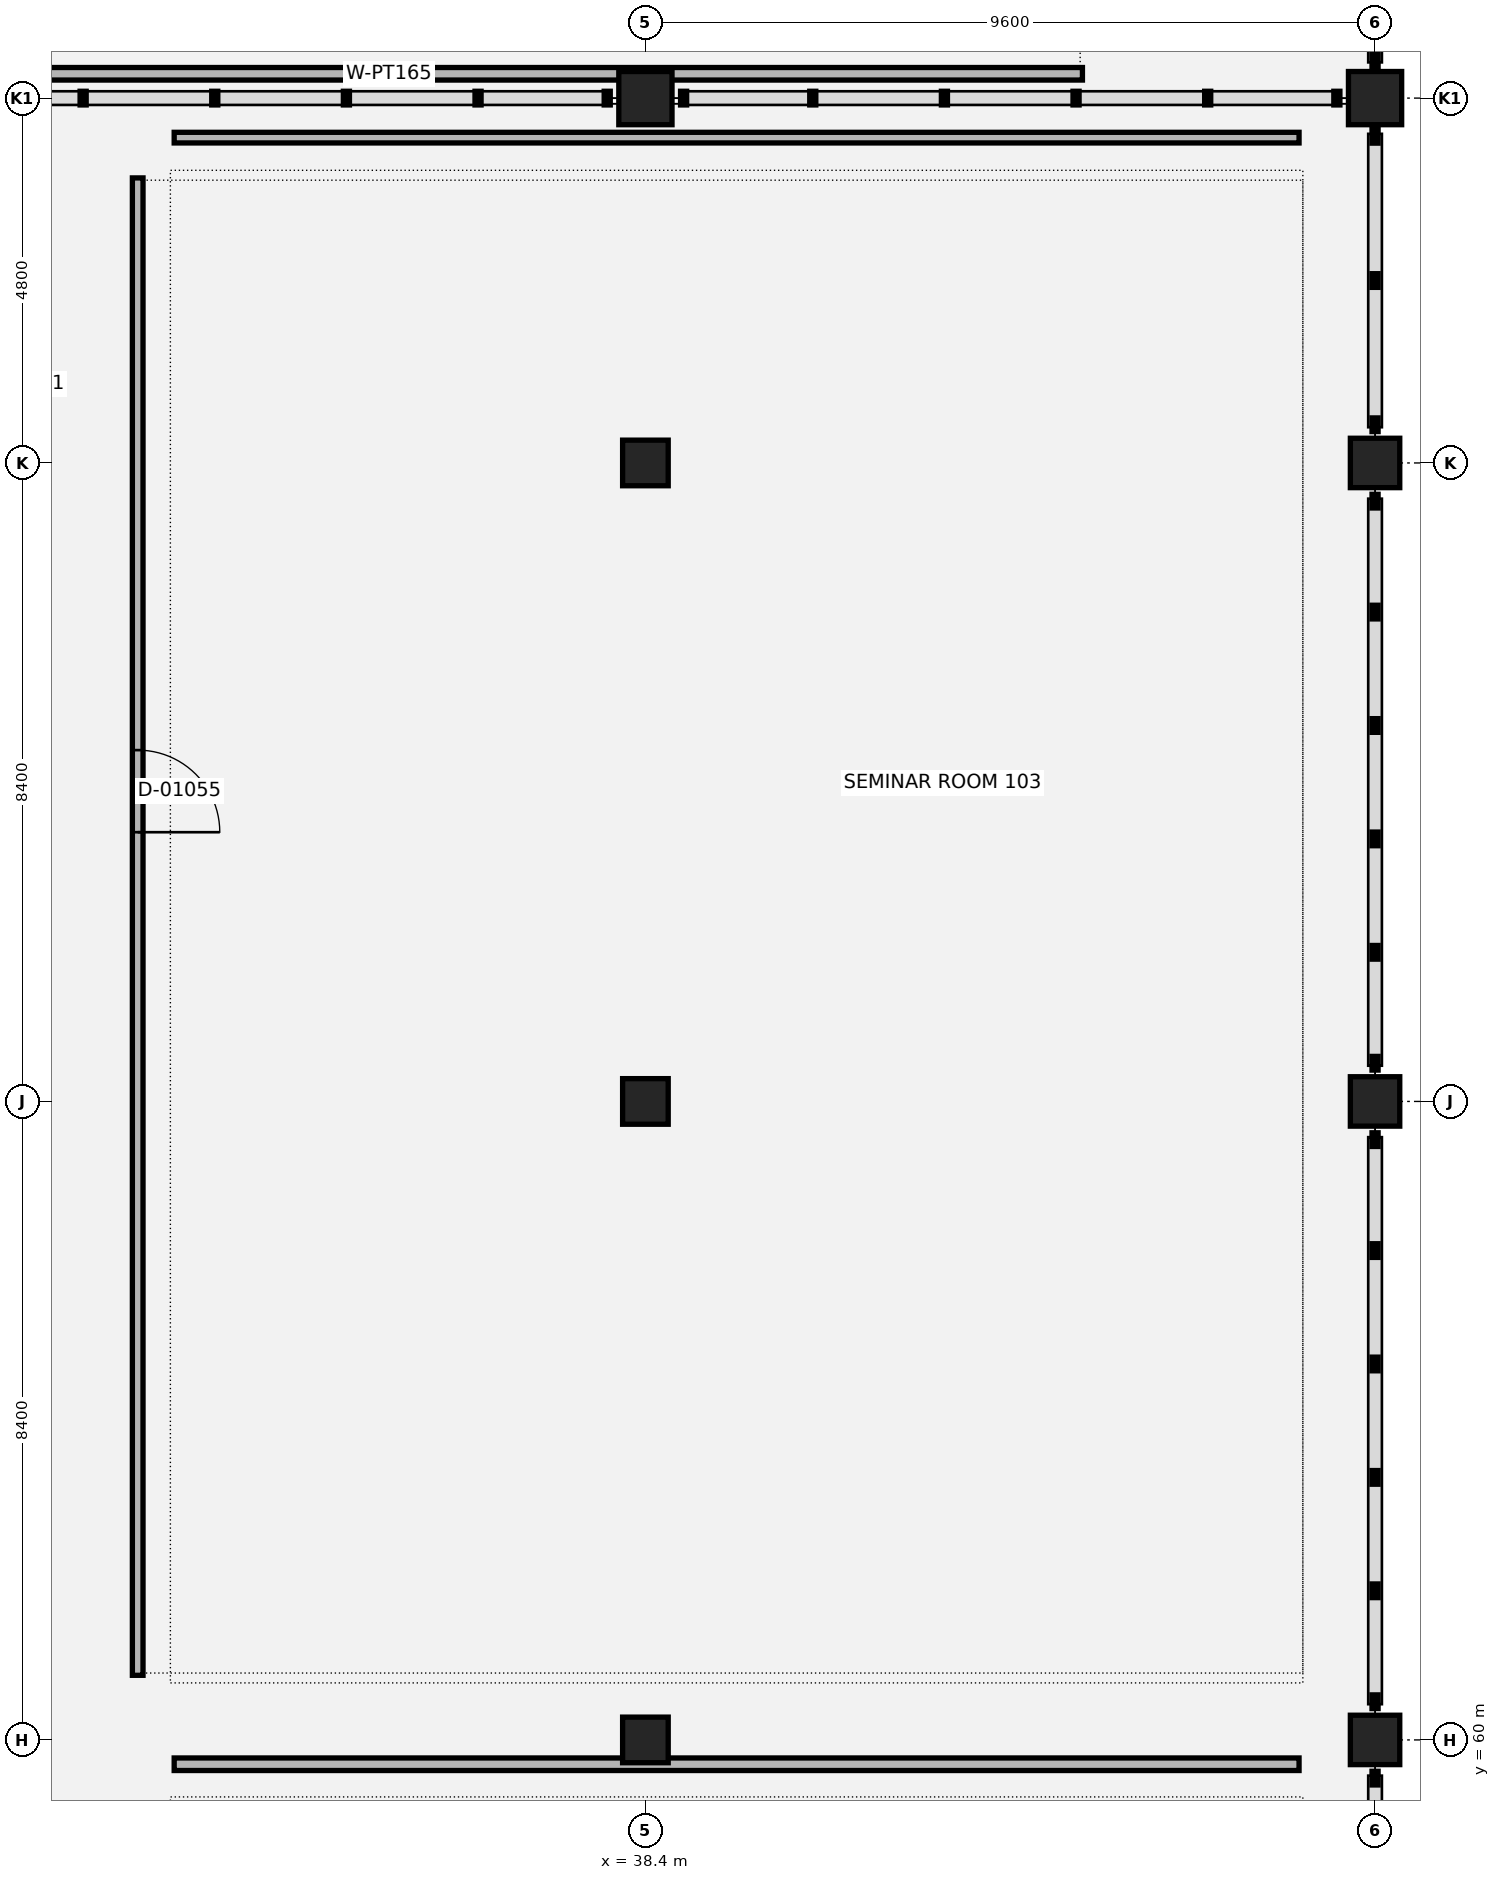
"""IFC4 building model, lengths in metres.
Left out: names, types, materials, properties, quantities, classifications, styles, units other than length and angle.
Written with IfcOpenShell. Run it as: python <this file> out.ifc"""

import sys

from ifc_helpers import new_model, si_unit, direction, frame, frame_2d, origin, origin_2d, place, context, subcontext, project, spatial, rectangle, extrude, element, fill, save


model = new_model("IFC4")
c1 = context("Model", 3, precision=1e-05, world=origin(), true_north=direction((0.0, 1.0)))
c2 = subcontext(c1, "Body", "Model", "MODEL_VIEW")
j1 = project(units=[si_unit("LENGTHUNIT", "METRE"), si_unit("PLANEANGLEUNIT", "RADIAN")], contexts=[c1])
p1 = place(None, origin())
s1 = spatial("IfcSite", under=j1, at=p1, CompositionType="ELEMENT")
p2 = place(p1, origin())
s2 = spatial("IfcBuilding", under=s1, at=p2, CompositionType="ELEMENT")
p3 = place(p2, frame((0.0, 0.0, 5.4)))
s3 = spatial("IfcBuildingStorey", under=s2, at=p3, CompositionType="ELEMENT", Elevation=5.4)
for number, where, z_axis, x_axis in (
    (1, (38.4, 60.0, 0.0), (0.0, 0.0, 1.0), (1.0, 0.0, 0.0)),
    (2, (38.4, 68.4, 0.0), (0.0, 0.0, 1.0), (1.0, 0.0, 0.0)),
    (3, (38.4, 76.8, 0.0), (0.0, 0.0, 1.0), (1.0, 0.0, 0.0)),
):
    element("IfcColumn", number, at=place(p3, frame(where, z_axis=z_axis, x_axis=x_axis)), inside=s3, PredefinedType="COLUMN", context=c2, shape_type="SweptSolid", body=[
        extrude(rectangle(XDim=0.6, YDim=0.6, at=origin_2d()), origin(), (0.0, 0.0, 1.0), 4.8),
    ])
p4 = place(p3, frame((38.4, 81.6, 0.0), z_axis=(0.0, 0.0, 1.0), x_axis=(1.0, 0.0, 0.0)))
e4 = element("IfcColumn", 4, at=p4, inside=s3, PredefinedType="COLUMN", context=c2, shape_type="SweptSolid", body=[
    extrude(rectangle(XDim=0.7, YDim=0.7, at=origin_2d()), origin(), (0.0, 0.0, 1.0), 4.8),
])
for number, where, z_axis, x_axis in (
    (5, (48.0, 60.0, 0.0), (0.0, 0.0, 1.0), (1.0, 0.0, 0.0)),
    (6, (48.0, 68.4, 0.0), (0.0, 0.0, 1.0), (1.0, 0.0, 0.0)),
    (7, (48.0, 76.8, 0.0), (0.0, 0.0, 1.0), (1.0, 0.0, 0.0)),
):
    element("IfcColumn", number, at=place(p3, frame(where, z_axis=z_axis, x_axis=x_axis)), inside=s3, PredefinedType="COLUMN", context=c2, shape_type="SweptSolid", body=[
        extrude(rectangle(XDim=0.65, YDim=0.65, at=origin_2d()), origin(), (0.0, 0.0, 1.0), 4.8),
    ])
p5 = place(p3, frame((48.0, 81.6, 0.0), z_axis=(0.0, 0.0, 1.0), x_axis=(1.0, 0.0, 0.0)))
e8 = element("IfcColumn", 8, at=p5, inside=s3, PredefinedType="COLUMN", context=c2, shape_type="SweptSolid", body=[
    extrude(rectangle(XDim=0.7, YDim=0.7, at=origin_2d()), origin(), (0.0, 0.0, 1.0), 4.8),
])
p6 = place(p3, frame((20.05, 81.92, 0.0), z_axis=(0.0, 0.0, 1.0), x_axis=(1.0, 0.0, 0.0)))
e9 = element("IfcWall", 9, at=p6, inside=s3, PredefinedType="PARTITIONING", context=c2, shape_type="SweptSolid", body=[
    extrude(rectangle(XDim=24.1, YDim=0.165, at=frame_2d((12.05, 0.0))), origin(), (0.0, 0.0, 1.0), 3.26),
])
p7 = place(p6, frame((3.712, 0.0, 0.0)))
e10 = element("IfcOpeningElement", 10, at=p7, cuts=e9, PredefinedType="OPENING", context=c2, shape_type="SweptSolid", body=[
    extrude(rectangle(XDim=1.22, YDim=2.15, at=frame_2d((0.61, 1.075))), frame((0.0, 0.093, 0.0), z_axis=(0.0, -1.0, 0.0), x_axis=(1.0, 0.0, 0.0)), (0.0, 0.0, 1.0), 0.185),
])
p8 = place(p3, frame((32.2, 59.68, 0.0), z_axis=(0.0, 0.0, 1.0), x_axis=(1.0, 0.0, 0.0)))
e11 = element("IfcWall", 11, at=p8, inside=s3, PredefinedType="PARTITIONING", context=c2, shape_type="SweptSolid", body=[
    extrude(rectangle(XDim=14.8, YDim=0.165, at=frame_2d((7.4, 0.0))), origin(), (0.0, 0.0, 1.0), 3.26),
])
p9 = place(p3, frame((31.72, 60.85, 0.0), z_axis=(0.0, 0.0, 1.0), x_axis=(0.0, 1.0, 0.0)))
e12 = element("IfcWall", 12, at=p9, inside=s3, PredefinedType="PARTITIONING", context=c2, shape_type="SweptSolid", body=[
    extrude(rectangle(XDim=19.7, YDim=0.14, at=frame_2d((9.85, 0.0))), origin(), (0.0, 0.0, 1.0), 3.26),
])
p10 = place(p9, frame((11.092, 0.0, 0.0)))
e13 = element("IfcOpeningElement", 13, at=p10, cuts=e12, PredefinedType="OPENING", context=c2, shape_type="SweptSolid", body=[
    extrude(rectangle(XDim=1.08, YDim=2.15, at=frame_2d((0.54, 1.075))), frame((0.0, 0.08, 0.0), z_axis=(0.0, -1.0, 0.0), x_axis=(1.0, 0.0, 0.0)), (0.0, 0.0, 1.0), 0.16),
])
p11 = place(p3, frame((32.2, 81.08, 0.0), z_axis=(0.0, 0.0, 1.0), x_axis=(1.0, 0.0, 0.0)))
e14 = element("IfcWall", 14, at=p11, inside=s3, PredefinedType="PARTITIONING", context=c2, shape_type="SweptSolid", body=[
    extrude(rectangle(XDim=14.8, YDim=0.14, at=frame_2d((7.4, 0.0))), origin(), (0.0, 0.0, 1.0), 3.26),
])
p12 = place(p10, origin())
e15 = element("IfcDoor", 15, at=p12, inside=s3, OperationType="SINGLE_SWING_RIGHT", PredefinedType="DOOR", context=c2, shape_type="SweptSolid", body=[
    extrude(rectangle(XDim=1.08, YDim=2.15, at=frame_2d((0.54, 1.075))), frame((0.0, 0.025, 0.0), z_axis=(0.0, -1.0, 0.0), x_axis=(1.0, 0.0, 0.0)), (0.0, 0.0, 1.0), 0.05),
])
fill(e13, e15)
save(model, sys.argv[1])
